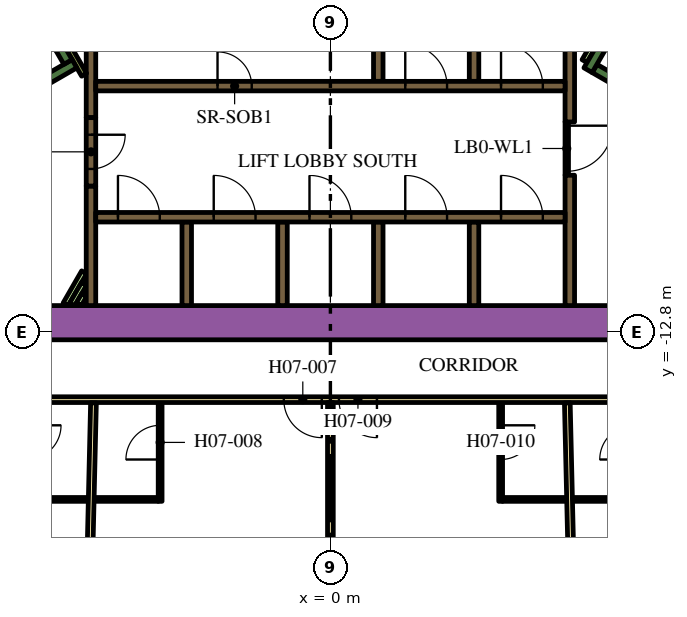
"""IFC4 building model, lengths in metres.
Left out: names, types, materials, properties, quantities, classifications, styles, units other than length and angle.
Written with IfcOpenShell. Run it as: python <this file> out.ifc"""

import sys

from ifc_helpers import new_model, si_unit, direction, frame, frame_2d, origin, place, context, subcontext, project, spatial, rectangle, extrude, element, fill, save


model = new_model("IFC4")
c1 = context("Model", 3, precision=1e-05, world=origin(), true_north=direction((0.0, 1.0)))
c2 = subcontext(c1, "Body", "Model", "MODEL_VIEW")
j1 = project(units=[si_unit("LENGTHUNIT", "METRE"), si_unit("PLANEANGLEUNIT", "RADIAN")], contexts=[c1])
p1 = place(None, origin())
s1 = spatial("IfcSite", under=j1, at=p1, CompositionType="ELEMENT")
p2 = place(p1, origin())
s2 = spatial("IfcBuilding", under=s1, at=p2, CompositionType="ELEMENT")
p3 = place(p2, frame((0.0, 0.0, 103.2)))
s3 = spatial("IfcBuildingStorey", under=s2, at=p3, CompositionType="ELEMENT", Elevation=103.2)
p4 = place(p3, frame((-12.019, -12.55, 0.0), z_axis=(0.0, 0.0, 1.0), x_axis=(1.0, 0.0, 0.0)))
e1 = element("IfcWall", 1, at=p4, inside=s3, PredefinedType="SOLIDWALL", context=c2, shape_type="SweptSolid", body=[
    extrude(rectangle(XDim=21.63, YDim=0.9, at=frame_2d((10.815, 0.0))), origin(), (0.0, 0.0, 1.0), 3.9),
])
p5 = place(p3, frame((12.84, -9.261, 0.0), z_axis=(0.0, 0.0, 1.0), x_axis=(-0.866013990052, 0.500019768644, 0.0)))
e2 = element("IfcWall", 2, at=p5, inside=s3, PredefinedType="SOLIDWALL", context=c2, shape_type="SweptSolid", body=[
    extrude(rectangle(XDim=6.8, YDim=0.25, at=frame_2d((3.4, 0.0))), origin(), (0.0, 0.0, 1.0), 3.9),
])
p6 = place(p3, frame((6.78, -5.906, 0.0), z_axis=(0.0, 0.0, 1.0), x_axis=(0.500223362819, 0.865896406789, 0.0)))
e3 = element("IfcWall", 3, at=p6, inside=s3, PredefinedType="SOLIDWALL", context=c2, shape_type="SweptSolid", body=[
    extrude(rectangle(XDim=0.675, YDim=0.25, at=frame_2d((0.337, 0.0))), origin(), (0.0, 0.0, 1.0), 3.9),
])
p7 = place(p3, frame((-12.84, -9.261, 0.0), z_axis=(0.0, 0.0, 1.0), x_axis=(0.866016039709, 0.500016218704, 0.0)))
e4 = element("IfcWall", 4, at=p7, inside=s3, PredefinedType="SOLIDWALL", context=c2, shape_type="SweptSolid", body=[
    extrude(rectangle(XDim=7.05, YDim=0.25, at=frame_2d((3.525, 0.0))), origin(), (0.0, 0.0, 1.0), 3.9),
])
p8 = place(p3, frame((-6.905, -5.69, 0.0), z_axis=(0.0, 0.0, 1.0), x_axis=(-0.500402024738, 0.865793170242, 0.0)))
e5 = element("IfcWall", 5, at=p8, inside=s3, PredefinedType="SOLIDWALL", context=c2, shape_type="SweptSolid", body=[
    extrude(rectangle(XDim=0.425, YDim=0.25, at=frame_2d((0.212, 0.0))), origin(), (0.0, 0.0, 1.0), 3.9),
])
p9 = place(p3, frame((-3.78, -12.1, 0.0), z_axis=(0.0, 0.0, 1.0), x_axis=(0.0, 1.0, 0.0)))
e6 = element("IfcWall", 6, at=p9, inside=s3, PredefinedType="SOLIDWALL", context=c2, shape_type="SweptSolid", body=[
    extrude(rectangle(XDim=2.2, YDim=0.25, at=frame_2d((1.1, 0.0))), origin(), (0.0, 0.0, 1.0), 3.9),
])
p10 = place(p3, frame((-6.3, -12.1, 0.0), z_axis=(0.0, 0.0, 1.0), x_axis=(0.0, 1.0, 0.0)))
e7 = element("IfcWall", 7, at=p10, inside=s3, PredefinedType="SOLIDWALL", context=c2, shape_type="SweptSolid", body=[
    extrude(rectangle(XDim=3.146, YDim=0.25, at=frame_2d((1.573, 0.0))), origin(), (0.0, 0.0, 1.0), 3.9),
])
p11 = place(p3, frame((6.3, -8.67, 0.0), z_axis=(0.0, 0.0, 1.0), x_axis=(0.0, -1.0, 0.0)))
e8 = element("IfcWall", 8, at=p11, inside=s3, PredefinedType="SOLIDWALL", context=c2, shape_type="SweptSolid", body=[
    extrude(rectangle(XDim=3.43, YDim=0.25, at=frame_2d((1.715, 0.0))), origin(), (0.0, 0.0, 1.0), 3.9),
])
p12 = place(p3, frame((6.3, -7.268, 0.0), z_axis=(0.0, 0.0, 1.0), x_axis=(0.0, 1.0, 0.0)))
e9 = element("IfcWall", 9, at=p12, inside=s3, PredefinedType="SOLIDWALL", context=c2, shape_type="SweptSolid", body=[
    extrude(rectangle(XDim=3.268, YDim=0.25, at=frame_2d((1.634, 0.0))), origin(), (0.0, 0.0, 1.0), 3.9),
])
for number, where, z_axis, x_axis in (
    (10, (3.78, -4.0, 0.0), (0.0, 0.0, 1.0), (0.0, -1.0, 0.0)),
    (11, (1.26, -4.0, 0.0), (0.0, 0.0, 1.0), (0.0, -1.0, 0.0)),
):
    element("IfcWall", number, at=place(p3, frame(where, z_axis=z_axis, x_axis=x_axis)), inside=s3, PredefinedType="SOLIDWALL", context=c2, shape_type="SweptSolid", body=[
        extrude(rectangle(XDim=2.2, YDim=0.25, at=frame_2d((1.1, 0.0))), origin(), (0.0, 0.0, 1.0), 3.9),
    ])
p13 = place(p3, frame((-6.3, -4.0, 0.0), z_axis=(0.0, 0.0, 1.0), x_axis=(0.0, -1.0, 0.0)))
e12 = element("IfcWall", 12, at=p13, inside=s3, PredefinedType="SOLIDWALL", context=c2, shape_type="SweptSolid", body=[
    extrude(rectangle(XDim=3.154, YDim=0.25, at=frame_2d((1.577, 0.0))), origin(), (0.0, 0.0, 1.0), 3.9),
])
for number, where, z_axis, x_axis in (
    (13, (3.78, -12.1, 0.0), (0.0, 0.0, 1.0), (0.0, 1.0, 0.0)),
    (14, (1.26, -12.1, 0.0), (0.0, 0.0, 1.0), (0.0, 1.0, 0.0)),
    (15, (-1.26, -12.1, 0.0), (0.0, 0.0, 1.0), (0.0, 1.0, 0.0)),
):
    element("IfcWall", number, at=place(p3, frame(where, z_axis=z_axis, x_axis=x_axis)), inside=s3, PredefinedType="SOLIDWALL", context=c2, shape_type="SweptSolid", body=[
        extrude(rectangle(XDim=2.2, YDim=0.25, at=frame_2d((1.1, 0.0))), origin(), (0.0, 0.0, 1.0), 3.9),
    ])
p14 = place(p3, frame((-6.968, -12.068, 0.0), z_axis=(0.0, 0.0, 1.0), x_axis=(0.49998975084, 0.866031321059, 0.0)))
e16 = element("IfcWall", 16, at=p14, inside=s3, PredefinedType="PARTITIONING", context=c2, shape_type="SweptSolid", body=[
    extrude(rectangle(XDim=0.975, YDim=0.15, at=frame_2d((0.488, 0.0))), origin(), (0.0, 0.0, 1.0), 2.75),
])
p15 = place(p3, frame((-6.794, -12.068, 0.0), z_axis=(0.0, 0.0, 1.0), x_axis=(0.49985693963, 0.866107983974, 0.0)))
e17 = element("IfcWall", 17, at=p15, inside=s3, PredefinedType="PARTITIONING", context=c2, shape_type="SweptSolid", body=[
    extrude(rectangle(XDim=0.629, YDim=0.15, at=frame_2d((0.314, 0.0))), origin(), (0.0, 0.0, 1.0), 2.75),
])
p16 = place(p3, frame((-6.621, -12.068, 0.0), z_axis=(0.0, 0.0, 1.0), x_axis=(0.500046963369, 0.865998287773, 0.0)))
e18 = element("IfcWall", 18, at=p16, inside=s3, PredefinedType="PARTITIONING", context=c2, shape_type="SweptSolid", body=[
    extrude(rectangle(XDim=0.282, YDim=0.15, at=frame_2d((0.141, 0.0))), origin(), (0.0, 0.0, 1.0), 2.75),
])
p17 = place(p3, frame((-6.48, -6.027, 0.0), z_axis=(0.0, 0.0, 1.0), x_axis=(-0.499927229454, 0.866067413802, 0.0)))
e19 = element("IfcWall", 19, at=p17, inside=s3, PredefinedType="PARTITIONING", context=c2, shape_type="SweptSolid", body=[
    extrude(rectangle(XDim=0.929, YDim=0.15, at=frame_2d((0.464, 0.0))), origin(), (0.0, 0.0, 1.0), 3.9),
])
p18 = place(p3, frame((6.945, -5.222, 0.0), z_axis=(0.0, 0.0, 1.0), x_axis=(-0.499818422106, -0.866130212453, 0.0)))
e20 = element("IfcWall", 20, at=p18, inside=s3, PredefinedType="PARTITIONING", context=c2, shape_type="SweptSolid", body=[
    extrude(rectangle(XDim=0.514, YDim=0.15, at=frame_2d((0.257, 0.0))), origin(), (0.0, 0.0, 1.0), 2.75),
])
p19 = place(p3, frame((-6.175, -9.775, 0.0), z_axis=(0.0, 0.0, 1.0), x_axis=(1.0, 0.0, 0.0)))
e21 = element("IfcWall", 21, at=p19, inside=s3, PredefinedType="SOLIDWALL", context=c2, shape_type="SweptSolid", body=[
    extrude(rectangle(XDim=12.35, YDim=0.25, at=frame_2d((6.175, 0.0))), origin(), (0.0, 0.0, 1.0), 3.9),
])
p20 = place(p19, frame((0.585, 0.0, 0.0)))
e22 = element("IfcOpeningElement", 22, at=p20, cuts=e21, PredefinedType="OPENING", context=c2, shape_type="SweptSolid", body=[
    extrude(rectangle(XDim=1.1, YDim=2.1, at=frame_2d((0.55, 1.05))), frame((0.0, 0.135, 0.0), z_axis=(0.0, -1.0, 0.0), x_axis=(1.0, 0.0, 0.0)), (0.0, 0.0, 1.0), 0.27),
])
p21 = place(p19, frame((3.105, 0.0, 0.0)))
e23 = element("IfcOpeningElement", 23, at=p21, cuts=e21, PredefinedType="OPENING", context=c2, shape_type="SweptSolid", body=[
    extrude(rectangle(XDim=1.1, YDim=2.1, at=frame_2d((0.55, 1.05))), frame((0.0, 0.135, 0.0), z_axis=(0.0, -1.0, 0.0), x_axis=(1.0, 0.0, 0.0)), (0.0, 0.0, 1.0), 0.27),
])
p22 = place(p19, frame((5.625, 0.0, 0.0)))
e24 = element("IfcOpeningElement", 24, at=p22, cuts=e21, PredefinedType="OPENING", context=c2, shape_type="SweptSolid", body=[
    extrude(rectangle(XDim=1.1, YDim=2.1, at=frame_2d((0.55, 1.05))), frame((0.0, 0.135, 0.0), z_axis=(0.0, -1.0, 0.0), x_axis=(1.0, 0.0, 0.0)), (0.0, 0.0, 1.0), 0.27),
])
p23 = place(p19, frame((8.145, 0.0, 0.0)))
e25 = element("IfcOpeningElement", 25, at=p23, cuts=e21, PredefinedType="OPENING", context=c2, shape_type="SweptSolid", body=[
    extrude(rectangle(XDim=1.1, YDim=2.1, at=frame_2d((0.55, 1.05))), frame((0.0, 0.135, 0.0), z_axis=(0.0, -1.0, 0.0), x_axis=(1.0, 0.0, 0.0)), (0.0, 0.0, 1.0), 0.27),
])
p24 = place(p19, frame((10.665, 0.0, 0.0)))
e26 = element("IfcOpeningElement", 26, at=p24, cuts=e21, PredefinedType="OPENING", context=c2, shape_type="SweptSolid", body=[
    extrude(rectangle(XDim=1.1, YDim=2.1, at=frame_2d((0.55, 1.05))), frame((0.0, 0.135, 0.0), z_axis=(0.0, -1.0, 0.0), x_axis=(1.0, 0.0, 0.0)), (0.0, 0.0, 1.0), 0.27),
])
p25 = place(p3, frame((-6.175, -6.325, 0.0), z_axis=(0.0, 0.0, 1.0), x_axis=(1.0, 0.0, 0.0)))
e27 = element("IfcWall", 27, at=p25, inside=s3, PredefinedType="SOLIDWALL", context=c2, shape_type="SweptSolid", body=[
    extrude(rectangle(XDim=12.35, YDim=0.25, at=frame_2d((6.175, 0.0))), origin(), (0.0, 0.0, 1.0), 3.9),
])
p26 = place(p25, frame((3.205, 0.0, 0.0)))
e28 = element("IfcOpeningElement", 28, at=p26, cuts=e27, PredefinedType="OPENING", context=c2, shape_type="SweptSolid", body=[
    extrude(rectangle(XDim=0.9, YDim=2.1, at=frame_2d((0.45, 1.05))), frame((0.0, 0.135, 0.0), z_axis=(0.0, -1.0, 0.0), x_axis=(1.0, 0.0, 0.0)), (0.0, 0.0, 1.0), 0.27),
])
p27 = place(p25, frame((8.145, 0.0, 0.0)))
e29 = element("IfcOpeningElement", 29, at=p27, cuts=e27, PredefinedType="OPENING", context=c2, shape_type="SweptSolid", body=[
    extrude(rectangle(XDim=1.1, YDim=2.1, at=frame_2d((0.55, 1.05))), frame((0.0, 0.135, 0.0), z_axis=(0.0, -1.0, 0.0), x_axis=(1.0, 0.0, 0.0)), (0.0, 0.0, 1.0), 0.27),
])
p28 = place(p25, frame((10.665, 0.0, 0.0)))
e30 = element("IfcOpeningElement", 30, at=p28, cuts=e27, PredefinedType="OPENING", context=c2, shape_type="SweptSolid", body=[
    extrude(rectangle(XDim=1.1, YDim=2.1, at=frame_2d((0.55, 1.05))), frame((0.0, 0.135, 0.0), z_axis=(0.0, -1.0, 0.0), x_axis=(1.0, 0.0, 0.0)), (0.0, 0.0, 1.0), 0.27),
])
p29 = place(p3, frame((-6.3, -7.154, 0.0), z_axis=(0.0, 0.0, 1.0), x_axis=(0.0, -1.0, 0.0)))
e31 = element("IfcWall", 31, at=p29, inside=s3, PredefinedType="SOLIDWALL", context=c2, shape_type="SweptSolid", body=[
    extrude(rectangle(XDim=1.8, YDim=0.25, at=frame_2d((0.9, 0.0))), origin(), (0.0, 0.0, 1.0), 3.9),
])
p30 = place(p29, frame((0.45, 0.0, 0.0)))
e32 = element("IfcOpeningElement", 32, at=p30, cuts=e31, PredefinedType="OPENING", context=c2, shape_type="SweptSolid", body=[
    extrude(rectangle(XDim=0.9, YDim=2.1, at=frame_2d((0.45, 1.05))), frame((0.0, 0.135, 0.0), z_axis=(0.0, -1.0, 0.0), x_axis=(1.0, 0.0, 0.0)), (0.0, 0.0, 1.0), 0.27),
])
p31 = place(p3, frame((6.22, -7.266, 0.0), z_axis=(0.0, 0.0, 1.0), x_axis=(0.0, -1.0, 0.0)))
e33 = element("IfcWall", 33, at=p31, inside=s3, PredefinedType="PARTITIONING", context=c2, shape_type="SweptSolid", body=[
    extrude(rectangle(XDim=1.4, YDim=0.09, at=frame_2d((0.7, 0.0))), origin(), (0.0, 0.0, 1.0), 2.75),
])
p32 = place(p31, frame((0.1, 0.0, 0.0)))
e34 = element("IfcOpeningElement", 34, at=p32, cuts=e33, PredefinedType="OPENING", context=c2, shape_type="SweptSolid", body=[
    extrude(rectangle(XDim=1.2, YDim=2.1, at=frame_2d((0.6, 1.05))), frame((0.0, 0.055, 0.0), z_axis=(0.0, -1.0, 0.0), x_axis=(1.0, 0.0, 0.0)), (0.0, 0.0, 1.0), 0.11),
])
p33 = place(p3, frame((12.918, -14.575, 0.0), z_axis=(0.0, 0.0, 1.0), x_axis=(-1.0, 0.0, 0.0)))
e35 = element("IfcWall", 35, at=p33, inside=s3, PredefinedType="PARTITIONING", context=c2, shape_type="SweptSolid", body=[
    extrude(rectangle(XDim=25.766, YDim=0.15, at=frame_2d((12.883, 0.0))), origin(), (0.0, 0.0, 1.0), 2.75),
])
p34 = place(p33, frame((24.24, 0.0, 0.0)))
e36 = element("IfcOpeningElement", 36, at=p34, cuts=e35, PredefinedType="OPENING", context=c2, shape_type="SweptSolid", body=[
    extrude(rectangle(XDim=1.0, YDim=2.1, at=frame_2d((0.5, 1.05))), frame((0.0, 0.085, 0.0), z_axis=(0.0, -1.0, 0.0), x_axis=(1.0, 0.0, 0.0)), (0.0, 0.0, 1.0), 0.17),
])
p35 = place(p33, frame((13.144, 0.0, 0.0)))
e37 = element("IfcOpeningElement", 37, at=p35, cuts=e35, PredefinedType="OPENING", context=c2, shape_type="SweptSolid", body=[
    extrude(rectangle(XDim=1.0, YDim=2.1, at=frame_2d((0.5, 1.05))), frame((0.0, 0.085, 0.0), z_axis=(0.0, -1.0, 0.0), x_axis=(1.0, 0.0, 0.0)), (0.0, 0.0, 1.0), 0.17),
])
p36 = place(p33, frame((11.693, 0.0, 0.0)))
e38 = element("IfcOpeningElement", 38, at=p36, cuts=e35, PredefinedType="OPENING", context=c2, shape_type="SweptSolid", body=[
    extrude(rectangle(XDim=1.0, YDim=2.1, at=frame_2d((0.5, 1.05))), frame((0.0, 0.085, 0.0), z_axis=(0.0, -1.0, 0.0), x_axis=(1.0, 0.0, 0.0)), (0.0, 0.0, 1.0), 0.17),
])
p37 = place(p33, frame((0.596, 0.0, 0.0)))
e39 = element("IfcOpeningElement", 39, at=p37, cuts=e35, PredefinedType="OPENING", context=c2, shape_type="SweptSolid", body=[
    extrude(rectangle(XDim=1.0, YDim=2.1, at=frame_2d((0.5, 1.05))), frame((0.0, 0.085, 0.0), z_axis=(0.0, -1.0, 0.0), x_axis=(1.0, 0.0, 0.0)), (0.0, 0.0, 1.0), 0.17),
])
p38 = place(p3, frame((-6.389, -21.269, 0.0), z_axis=(0.0, 0.0, 1.0), x_axis=(0.023377429176, 0.999726710559, 0.0)))
e40 = element("IfcWall", 40, at=p38, inside=s3, PredefinedType="PARTITIONING", context=c2, shape_type="SweptSolid", body=[
    extrude(rectangle(XDim=6.611, YDim=0.15, at=frame_2d((3.305, 0.0))), origin(), (0.0, 0.0, 1.0), 2.75),
])
p39 = place(p3, frame((0.0, -21.344, 0.0), z_axis=(0.0, 0.0, 1.0), x_axis=(0.0, 1.0, 0.0)))
e41 = element("IfcWall", 41, at=p39, inside=s3, PredefinedType="PARTITIONING", context=c2, shape_type="SweptSolid", body=[
    extrude(rectangle(XDim=6.694, YDim=0.15, at=frame_2d((3.347, 0.0))), origin(), (0.0, 0.0, 1.0), 2.75),
])
p40 = place(p3, frame((6.389, -21.269, 0.0), z_axis=(0.0, 0.0, 1.0), x_axis=(-0.023377429176, 0.999726710559, 0.0)))
e42 = element("IfcWall", 42, at=p40, inside=s3, PredefinedType="PARTITIONING", context=c2, shape_type="SweptSolid", body=[
    extrude(rectangle(XDim=6.611, YDim=0.15, at=frame_2d((3.305, 0.0))), origin(), (0.0, 0.0, 1.0), 2.75),
])
p41 = place(p3, frame((-7.938, -17.2, 0.0), z_axis=(0.0, 0.0, 1.0), x_axis=(1.0, 0.0, 0.0)))
e43 = element("IfcWall", 43, at=p41, inside=s3, PredefinedType="PARTITIONING", context=c2, shape_type="SweptSolid", body=[
    extrude(rectangle(XDim=1.56, YDim=0.1, at=frame_2d((0.78, 0.0))), origin(), (0.0, 0.0, 1.0), 2.75),
])
p42 = place(p3, frame((-4.48, -17.25, 0.0), z_axis=(0.0, 0.0, 1.0), x_axis=(0.0, 1.0, 0.0)))
e44 = element("IfcWall", 44, at=p42, inside=s3, PredefinedType="PARTITIONING", context=c2, shape_type="SweptSolid", body=[
    extrude(rectangle(XDim=2.6, YDim=0.1, at=frame_2d((1.3, 0.0))), origin(), (0.0, 0.0, 1.0), 2.75),
])
p43 = place(p42, frame((1.1, 0.0, 0.0)))
e45 = element("IfcOpeningElement", 45, at=p43, cuts=e44, PredefinedType="OPENING", context=c2, shape_type="SweptSolid", body=[
    extrude(rectangle(XDim=0.9, YDim=2.1, at=frame_2d((0.45, 1.05))), frame((0.0, 0.06, 0.0), z_axis=(0.0, -1.0, 0.0), x_axis=(1.0, 0.0, 0.0)), (0.0, 0.0, 1.0), 0.12),
])
p44 = place(p3, frame((-4.53, -17.2, 0.0), z_axis=(0.0, 0.0, 1.0), x_axis=(-1.0, 0.0, 0.0)))
e46 = element("IfcWall", 46, at=p44, inside=s3, PredefinedType="PARTITIONING", context=c2, shape_type="SweptSolid", body=[
    extrude(rectangle(XDim=1.68, YDim=0.1, at=frame_2d((0.84, 0.0))), origin(), (0.0, 0.0, 1.0), 2.75),
])
p45 = place(p3, frame((4.48, -14.65, 0.0), z_axis=(0.0, 0.0, 1.0), x_axis=(0.0, -1.0, 0.0)))
e47 = element("IfcWall", 47, at=p45, inside=s3, PredefinedType="PARTITIONING", context=c2, shape_type="SweptSolid", body=[
    extrude(rectangle(XDim=2.6, YDim=0.1, at=frame_2d((1.3, 0.0))), origin(), (0.0, 0.0, 1.0), 2.75),
])
p46 = place(p45, frame((0.6, 0.0, 0.0)))
e48 = element("IfcOpeningElement", 48, at=p46, cuts=e47, PredefinedType="OPENING", context=c2, shape_type="SweptSolid", body=[
    extrude(rectangle(XDim=0.9, YDim=2.1, at=frame_2d((0.45, 1.05))), frame((0.0, 0.06, 0.0), z_axis=(0.0, -1.0, 0.0), x_axis=(1.0, 0.0, 0.0)), (0.0, 0.0, 1.0), 0.12),
])
p47 = place(p3, frame((4.53, -17.2, 0.0), z_axis=(0.0, 0.0, 1.0), x_axis=(1.0, 0.0, 0.0)))
e49 = element("IfcWall", 49, at=p47, inside=s3, PredefinedType="PARTITIONING", context=c2, shape_type="SweptSolid", body=[
    extrude(rectangle(XDim=1.68, YDim=0.1, at=frame_2d((0.84, 0.0))), origin(), (0.0, 0.0, 1.0), 2.75),
])
p48 = place(p3, frame((7.938, -17.2, 0.0), z_axis=(0.0, 0.0, 1.0), x_axis=(-1.0, 0.0, 0.0)))
e50 = element("IfcWall", 50, at=p48, inside=s3, PredefinedType="PARTITIONING", context=c2, shape_type="SweptSolid", body=[
    extrude(rectangle(XDim=1.56, YDim=0.1, at=frame_2d((0.78, 0.0))), origin(), (0.0, 0.0, 1.0), 2.75),
])
p49 = place(p20, origin())
e51 = element("IfcDoor", 51, at=p49, inside=s3, OperationType="DOUBLE_DOOR_SLIDING", PredefinedType="DOOR", context=c2, shape_type="SweptSolid", body=[
    extrude(rectangle(XDim=1.1, YDim=2.1, at=frame_2d((0.55, 1.05))), frame((0.0, 0.025, 0.0), z_axis=(0.0, -1.0, 0.0), x_axis=(1.0, 0.0, 0.0)), (0.0, 0.0, 1.0), 0.05),
])
fill(e22, e51)
p50 = place(p21, origin())
e52 = element("IfcDoor", 52, at=p50, inside=s3, OperationType="DOUBLE_DOOR_SLIDING", PredefinedType="DOOR", context=c2, shape_type="SweptSolid", body=[
    extrude(rectangle(XDim=1.1, YDim=2.1, at=frame_2d((0.55, 1.05))), frame((0.0, 0.025, 0.0), z_axis=(0.0, -1.0, 0.0), x_axis=(1.0, 0.0, 0.0)), (0.0, 0.0, 1.0), 0.05),
])
fill(e23, e52)
p51 = place(p22, origin())
e53 = element("IfcDoor", 53, at=p51, inside=s3, OperationType="DOUBLE_DOOR_SLIDING", PredefinedType="DOOR", context=c2, shape_type="SweptSolid", body=[
    extrude(rectangle(XDim=1.1, YDim=2.1, at=frame_2d((0.55, 1.05))), frame((0.0, 0.025, 0.0), z_axis=(0.0, -1.0, 0.0), x_axis=(1.0, 0.0, 0.0)), (0.0, 0.0, 1.0), 0.05),
])
fill(e24, e53)
p52 = place(p23, origin())
e54 = element("IfcDoor", 54, at=p52, inside=s3, OperationType="DOUBLE_DOOR_SLIDING", PredefinedType="DOOR", context=c2, shape_type="SweptSolid", body=[
    extrude(rectangle(XDim=1.1, YDim=2.1, at=frame_2d((0.55, 1.05))), frame((0.0, 0.025, 0.0), z_axis=(0.0, -1.0, 0.0), x_axis=(1.0, 0.0, 0.0)), (0.0, 0.0, 1.0), 0.05),
])
fill(e25, e54)
p53 = place(p24, origin())
e55 = element("IfcDoor", 55, at=p53, inside=s3, OperationType="DOUBLE_DOOR_SLIDING", PredefinedType="DOOR", context=c2, shape_type="SweptSolid", body=[
    extrude(rectangle(XDim=1.1, YDim=2.1, at=frame_2d((0.55, 1.05))), frame((0.0, 0.025, 0.0), z_axis=(0.0, -1.0, 0.0), x_axis=(1.0, 0.0, 0.0)), (0.0, 0.0, 1.0), 0.05),
])
fill(e26, e55)
p54 = place(p26, origin())
e56 = element("IfcDoor", 56, at=p54, inside=s3, OperationType="SINGLE_SWING_LEFT", PredefinedType="DOOR", context=c2, shape_type="SweptSolid", body=[
    extrude(rectangle(XDim=0.9, YDim=2.1, at=frame_2d((0.45, 1.05))), frame((0.0, 0.025, 0.0), z_axis=(0.0, -1.0, 0.0), x_axis=(1.0, 0.0, 0.0)), (0.0, 0.0, 1.0), 0.05),
])
fill(e28, e56)
p55 = place(p27, origin())
e57 = element("IfcDoor", 57, at=p55, inside=s3, OperationType="DOUBLE_DOOR_SLIDING", PredefinedType="DOOR", context=c2, shape_type="SweptSolid", body=[
    extrude(rectangle(XDim=1.1, YDim=2.1, at=frame_2d((0.55, 1.05))), frame((0.0, 0.025, 0.0), z_axis=(0.0, -1.0, 0.0), x_axis=(1.0, 0.0, 0.0)), (0.0, 0.0, 1.0), 0.05),
])
fill(e29, e57)
p56 = place(p28, origin())
e58 = element("IfcDoor", 58, at=p56, inside=s3, OperationType="DOUBLE_DOOR_SLIDING", PredefinedType="DOOR", context=c2, shape_type="SweptSolid", body=[
    extrude(rectangle(XDim=1.1, YDim=2.1, at=frame_2d((0.55, 1.05))), frame((0.0, 0.025, 0.0), z_axis=(0.0, -1.0, 0.0), x_axis=(1.0, 0.0, 0.0)), (0.0, 0.0, 1.0), 0.05),
])
fill(e30, e58)
p57 = place(p30, origin())
e59 = element("IfcDoor", 59, at=p57, inside=s3, OperationType="SINGLE_SWING_LEFT", PredefinedType="DOOR", context=c2, shape_type="SweptSolid", body=[
    extrude(rectangle(XDim=0.9, YDim=2.1, at=frame_2d((0.45, 1.05))), frame((0.0, 0.025, 0.0), z_axis=(0.0, -1.0, 0.0), x_axis=(1.0, 0.0, 0.0)), (0.0, 0.0, 1.0), 0.05),
])
fill(e32, e59)
p58 = place(p32, origin())
e60 = element("IfcDoor", 60, at=p58, inside=s3, OperationType="SINGLE_SWING_LEFT", PredefinedType="DOOR", context=c2, shape_type="SweptSolid", body=[
    extrude(rectangle(XDim=1.2, YDim=2.1, at=frame_2d((0.6, 1.05))), frame((0.0, 0.025, 0.0), z_axis=(0.0, -1.0, 0.0), x_axis=(1.0, 0.0, 0.0)), (0.0, 0.0, 1.0), 0.05),
])
fill(e34, e60)
p59 = place(p35, origin())
e61 = element("IfcDoor", 61, at=p59, inside=s3, OperationType="SINGLE_SWING_LEFT", PredefinedType="DOOR", context=c2, shape_type="SweptSolid", body=[
    extrude(rectangle(XDim=1.0, YDim=2.1, at=frame_2d((0.5, 1.05))), frame((0.0, 0.025, 0.0), z_axis=(0.0, -1.0, 0.0), x_axis=(1.0, 0.0, 0.0)), (0.0, 0.0, 1.0), 0.05),
])
fill(e37, e61)
p60 = place(p43, origin())
e62 = element("IfcDoor", 62, at=p60, inside=s3, OperationType="SINGLE_SWING_LEFT", PredefinedType="DOOR", context=c2, shape_type="SweptSolid", body=[
    extrude(rectangle(XDim=0.9, YDim=2.1, at=frame_2d((0.45, 1.05))), frame((0.0, 0.025, 0.0), z_axis=(0.0, -1.0, 0.0), x_axis=(1.0, 0.0, 0.0)), (0.0, 0.0, 1.0), 0.05),
])
fill(e45, e62)
p61 = place(p36, origin())
e63 = element("IfcDoor", 63, at=p61, inside=s3, OperationType="SINGLE_SWING_RIGHT", PredefinedType="DOOR", context=c2, shape_type="SweptSolid", body=[
    extrude(rectangle(XDim=1.0, YDim=2.1, at=frame_2d((0.5, 1.05))), frame((0.0, 0.025, 0.0), z_axis=(0.0, -1.0, 0.0), x_axis=(1.0, 0.0, 0.0)), (0.0, 0.0, 1.0), 0.05),
])
fill(e38, e63)
p62 = place(p46, origin())
e64 = element("IfcDoor", 64, at=p62, inside=s3, OperationType="SINGLE_SWING_LEFT", PredefinedType="DOOR", context=c2, shape_type="SweptSolid", body=[
    extrude(rectangle(XDim=0.9, YDim=2.1, at=frame_2d((0.45, 1.05))), frame((0.0, 0.025, 0.0), z_axis=(0.0, -1.0, 0.0), x_axis=(1.0, 0.0, 0.0)), (0.0, 0.0, 1.0), 0.05),
])
fill(e48, e64)
save(model, sys.argv[1])
